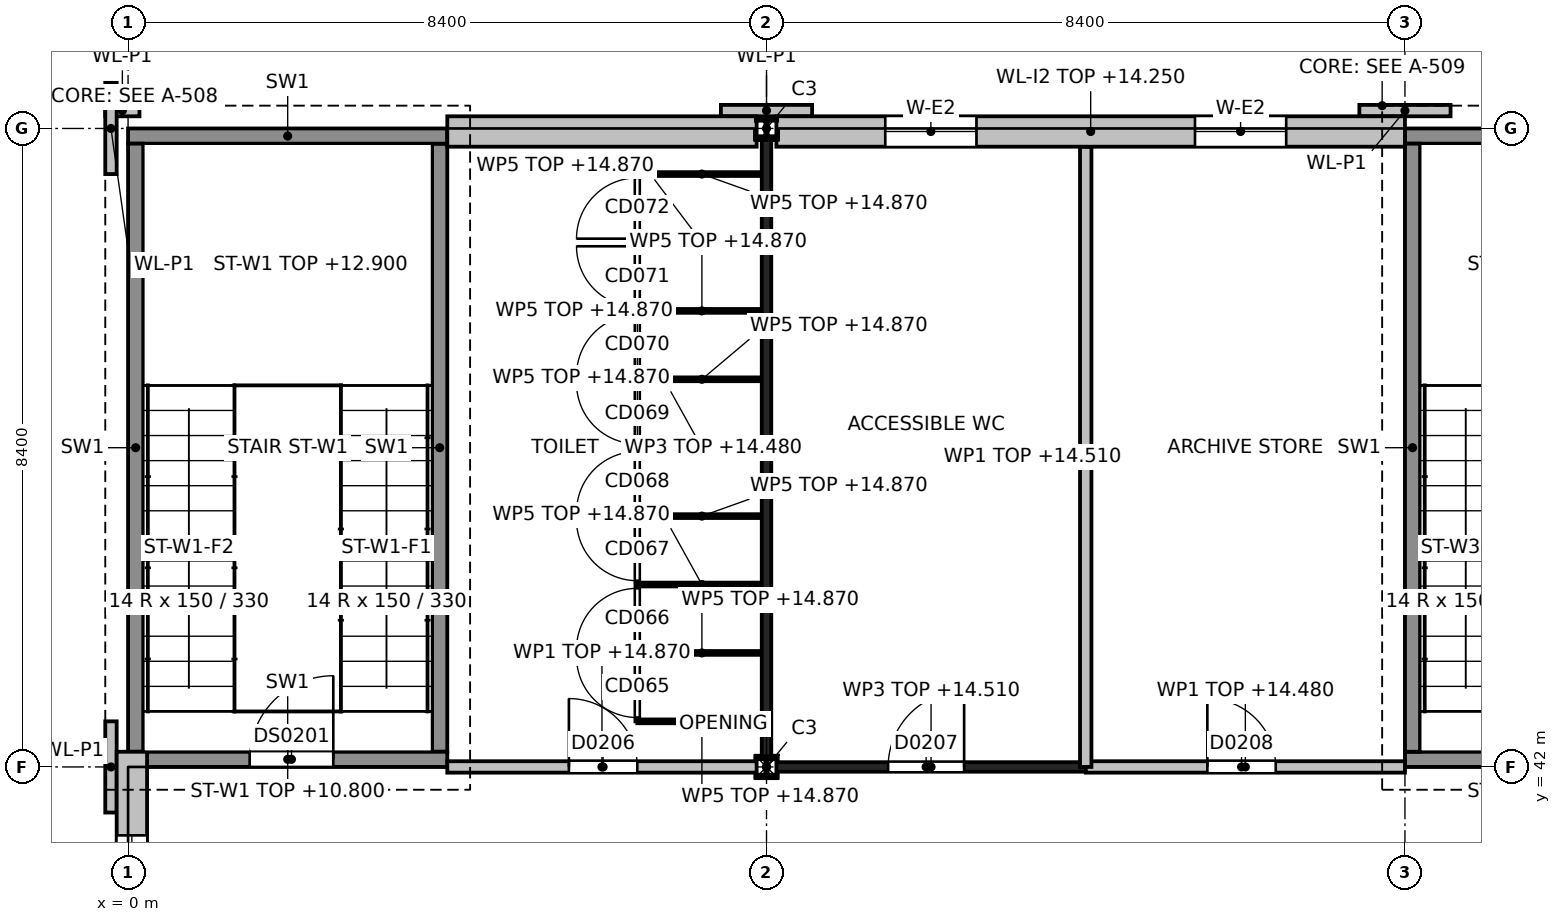
"""IFC4 building model, lengths in metres.
Left out: names, types, materials, properties, quantities, classifications, styles, units other than length and angle.
Written with IfcOpenShell. Run it as: python <this file> out.ifc"""

import sys

from ifc_helpers import new_model, si_unit, direction, frame, frame_2d, origin, origin_2d, place, context, subcontext, project, spatial, rectangle, i_section, extrude, element, fill, save


model = new_model("IFC4")
c1 = context("Model", 3, precision=1e-05, world=origin(), true_north=direction((0.0, 1.0)))
c2 = subcontext(c1, "Body", "Model", "MODEL_VIEW")
j1 = project(units=[si_unit("LENGTHUNIT", "METRE"), si_unit("PLANEANGLEUNIT", "RADIAN")], contexts=[c1])
p1 = place(None, origin())
s1 = spatial("IfcSite", under=j1, at=p1, CompositionType="ELEMENT")
p2 = place(p1, origin())
s2 = spatial("IfcBuilding", under=s1, at=p2, CompositionType="ELEMENT")
p3 = place(p2, frame((0.0, 0.0, 10.8)))
s3 = spatial("IfcBuildingStorey", under=s2, at=p3, CompositionType="ELEMENT", Elevation=10.8)
for number, where, z_axis, x_axis in (
    (1, (8.4, 42.0, 0.0), (0.0, 0.0, 1.0), (1.0, 0.0, 0.0)),
    (2, (8.4, 50.4, 0.0), (0.0, 0.0, 1.0), (1.0, 0.0, 0.0)),
):
    element("IfcColumn", number, at=place(p3, frame(where, z_axis=z_axis, x_axis=x_axis)), inside=s3, PredefinedType="COLUMN", context=c2, shape_type="SweptSolid", body=[
        extrude(i_section(OverallWidth=0.26, OverallDepth=0.26, WebThickness=0.01, FlangeThickness=0.018, at=origin_2d()), origin(), (0.0, 0.0, 1.0), 4.2),
    ])
p4 = place(p3, frame((0.0, 42.1, 0.0), z_axis=(0.0, 0.0, 1.0), x_axis=(1.0, 0.0, 0.0)))
e3 = element("IfcWall", 3, at=p4, inside=s3, PredefinedType="SHEAR", context=c2, shape_type="SweptSolid", body=[
    extrude(rectangle(XDim=4.2, YDim=0.2, at=frame_2d((2.1, 0.0))), origin(), (0.0, 0.0, 1.0), 4.2),
])
p5 = place(p4, frame((1.6, 0.0, 0.0)))
e4 = element("IfcOpeningElement", 4, at=p5, cuts=e3, PredefinedType="OPENING", context=c2, shape_type="SweptSolid", body=[
    extrude(rectangle(XDim=1.1, YDim=2.1, at=frame_2d((0.55, 1.05))), frame((0.0, 0.1, 0.0), z_axis=(0.0, -1.0, 0.0), x_axis=(1.0, 0.0, 0.0)), (0.0, 0.0, 1.0), 0.2),
])
p6 = place(p3, frame((0.0, 50.3, 0.0), z_axis=(0.0, 0.0, 1.0), x_axis=(1.0, 0.0, 0.0)))
e5 = element("IfcWall", 5, at=p6, inside=s3, PredefinedType="SHEAR", context=c2, shape_type="SweptSolid", body=[
    extrude(rectangle(XDim=4.2, YDim=0.2, at=frame_2d((2.1, 0.0))), origin(), (0.0, 0.0, 1.0), 4.2),
])
for number, where, z_axis, x_axis in (
    (6, (0.1, 42.2, 0.0), (0.0, 0.0, 1.0), (0.0, 1.0, 0.0)),
    (7, (4.1, 42.2, 0.0), (0.0, 0.0, 1.0), (0.0, 1.0, 0.0)),
):
    element("IfcWall", number, at=place(p3, frame(where, z_axis=z_axis, x_axis=x_axis)), inside=s3, PredefinedType="SHEAR", context=c2, shape_type="SweptSolid", body=[
        extrude(rectangle(XDim=8.0, YDim=0.2, at=frame_2d((4.0, 0.0))), origin(), (0.0, 0.0, 1.0), 4.2),
    ])
p7 = place(p3, frame((16.8, 42.1, 0.0), z_axis=(0.0, 0.0, 1.0), x_axis=(1.0, 0.0, 0.0)))
e8 = element("IfcWall", 8, at=p7, inside=s3, PredefinedType="SHEAR", context=c2, shape_type="SweptSolid", body=[
    extrude(rectangle(XDim=4.2, YDim=0.2, at=frame_2d((2.1, 0.0))), origin(), (0.0, 0.0, 1.0), 4.2),
])
p8 = place(p7, frame((1.6, 0.0, 0.0)))
e9 = element("IfcOpeningElement", 9, at=p8, cuts=e8, PredefinedType="OPENING", context=c2, shape_type="SweptSolid", body=[
    extrude(rectangle(XDim=1.1, YDim=2.1, at=frame_2d((0.55, 1.05))), frame((0.0, 0.1, 0.0), z_axis=(0.0, -1.0, 0.0), x_axis=(1.0, 0.0, 0.0)), (0.0, 0.0, 1.0), 0.2),
])
p9 = place(p3, frame((16.8, 50.3, 0.0), z_axis=(0.0, 0.0, 1.0), x_axis=(1.0, 0.0, 0.0)))
e10 = element("IfcWall", 10, at=p9, inside=s3, PredefinedType="SHEAR", context=c2, shape_type="SweptSolid", body=[
    extrude(rectangle(XDim=4.2, YDim=0.2, at=frame_2d((2.1, 0.0))), origin(), (0.0, 0.0, 1.0), 4.2),
])
p10 = place(p3, frame((16.9, 42.2, 0.0), z_axis=(0.0, 0.0, 1.0), x_axis=(0.0, 1.0, 0.0)))
e11 = element("IfcWall", 11, at=p10, inside=s3, PredefinedType="SHEAR", context=c2, shape_type="SweptSolid", body=[
    extrude(rectangle(XDim=8.0, YDim=0.2, at=frame_2d((4.0, 0.0))), origin(), (0.0, 0.0, 1.0), 4.2),
])
p11 = place(p3, frame((4.2, 50.36, 0.0), z_axis=(0.0, 0.0, 1.0), x_axis=(1.0, 0.0, 0.0)))
e12 = element("IfcWall", 12, at=p11, inside=s3, PredefinedType="SOLIDWALL", context=c2, shape_type="SweptSolid", body=[
    extrude(rectangle(XDim=4.07, YDim=0.4, at=frame_2d((2.035, 0.0))), origin(), (0.0, 0.0, 1.0), 3.45),
])
p12 = place(p3, frame((8.53, 50.36, 0.0), z_axis=(0.0, 0.0, 1.0), x_axis=(1.0, 0.0, 0.0)))
e13 = element("IfcWall", 13, at=p12, inside=s3, PredefinedType="SOLIDWALL", context=c2, shape_type="SweptSolid", body=[
    extrude(rectangle(XDim=8.27, YDim=0.4, at=frame_2d((4.135, 0.0))), origin(), (0.0, 0.0, 1.0), 3.45),
])
p13 = place(p12, frame((1.433, 0.0, 0.9)))
e14 = element("IfcOpeningElement", 14, at=p13, cuts=e13, PredefinedType="OPENING", context=c2, shape_type="SweptSolid", body=[
    extrude(rectangle(XDim=1.2, YDim=2.4, at=frame_2d((0.6, 1.2))), frame((0.0, 0.2, 0.0), z_axis=(0.0, -1.0, 0.0), x_axis=(1.0, 0.0, 0.0)), (0.0, 0.0, 1.0), 0.4),
])
p14 = place(p12, frame((5.508, 0.0, 0.9)))
e15 = element("IfcOpeningElement", 15, at=p14, cuts=e13, PredefinedType="OPENING", context=c2, shape_type="SweptSolid", body=[
    extrude(rectangle(XDim=1.2, YDim=2.4, at=frame_2d((0.6, 1.2))), frame((0.0, 0.2, 0.0), z_axis=(0.0, -1.0, 0.0), x_axis=(1.0, 0.0, 0.0)), (0.0, 0.0, 1.0), 0.4),
])
p15 = place(p3, frame((-0.3, 50.635, 0.0), z_axis=(0.0, 0.0, 1.0), x_axis=(1.0, 0.0, 0.0)))
e16 = element("IfcWall", 16, at=p15, inside=s3, PredefinedType="SOLIDWALL", context=c2, shape_type="SweptSolid", body=[
    extrude(rectangle(XDim=0.45, YDim=0.15, at=frame_2d((0.225, 0.0))), origin(), (0.0, 0.0, 1.0), 4.2),
])
for number, where, z_axis, x_axis in (
    (17, (7.8, 50.635, 0.0), (0.0, 0.0, 1.0), (1.0, 0.0, 0.0)),
    (18, (16.2, 50.635, 0.0), (0.0, 0.0, 1.0), (1.0, 0.0, 0.0)),
):
    element("IfcWall", number, at=place(p3, frame(where, z_axis=z_axis, x_axis=x_axis)), inside=s3, PredefinedType="SOLIDWALL", context=c2, shape_type="SweptSolid", body=[
        extrude(rectangle(XDim=1.2, YDim=0.15, at=frame_2d((0.6, 0.0))), origin(), (0.0, 0.0, 1.0), 4.2),
    ])
p16 = place(p3, frame((0.05, 33.73, 0.0), z_axis=(0.0, 0.0, 1.0), x_axis=(0.0, 1.0, 0.0)))
e19 = element("IfcWall", 19, at=p16, inside=s3, PredefinedType="SOLIDWALL", context=c2, shape_type="SweptSolid", body=[
    extrude(rectangle(XDim=8.47, YDim=0.4, at=frame_2d((4.235, 0.0))), origin(), (0.0, 0.0, 1.0), 3.45),
])
p17 = place(p16, frame((0.77, 0.0, 0.9)))
e20 = element("IfcOpeningElement", 20, at=p17, cuts=e19, PredefinedType="OPENING", context=c2, shape_type="SweptSolid", body=[
    extrude(rectangle(XDim=3.0, YDim=2.4, at=frame_2d((1.5, 1.2))), frame((0.0, 0.2, 0.0), z_axis=(0.0, -1.0, 0.0), x_axis=(1.0, 0.0, 0.0)), (0.0, 0.0, 1.0), 0.4),
])
p18 = place(p16, frame((4.37, 0.0, 0.9)))
e21 = element("IfcOpeningElement", 21, at=p18, cuts=e19, PredefinedType="OPENING", context=c2, shape_type="SweptSolid", body=[
    extrude(rectangle(XDim=3.0, YDim=2.4, at=frame_2d((1.5, 1.2))), frame((0.0, 0.2, 0.0), z_axis=(0.0, -1.0, 0.0), x_axis=(1.0, 0.0, 0.0)), (0.0, 0.0, 1.0), 0.4),
])
p19 = place(p3, frame((-0.225, 41.4, 0.0), z_axis=(0.0, 0.0, 1.0), x_axis=(0.0, 1.0, 0.0)))
e22 = element("IfcWall", 22, at=p19, inside=s3, PredefinedType="SOLIDWALL", context=c2, shape_type="SweptSolid", body=[
    extrude(rectangle(XDim=1.2, YDim=0.15, at=frame_2d((0.6, 0.0))), origin(), (0.0, 0.0, 1.0), 4.2),
])
p20 = place(p3, frame((-0.225, 49.8, 0.0), z_axis=(0.0, 0.0, 1.0), x_axis=(0.0, 1.0, 0.0)))
e23 = element("IfcWall", 23, at=p20, inside=s3, PredefinedType="SOLIDWALL", context=c2, shape_type="SweptSolid", body=[
    extrude(rectangle(XDim=1.2, YDim=0.15, at=frame_2d((0.6, 0.0))), origin(), (0.0, 0.0, 1.0), 4.2),
])
p21 = place(p3, frame((4.2, 42.0, 0.0), z_axis=(0.0, 0.0, 1.0), x_axis=(1.0, 0.0, 0.0)))
e24 = element("IfcWall", 24, at=p21, inside=s3, PredefinedType="PARTITIONING", context=c2, shape_type="SweptSolid", body=[
    extrude(rectangle(XDim=4.07, YDim=0.15, at=frame_2d((2.035, 0.0))), origin(), (0.0, 0.0, 1.0), 4.07),
])
p22 = place(p21, frame((1.6, 0.0, 0.0)))
e25 = element("IfcOpeningElement", 25, at=p22, cuts=e24, PredefinedType="OPENING", context=c2, shape_type="SweptSolid", body=[
    extrude(rectangle(XDim=0.9, YDim=2.1, at=frame_2d((0.45, 1.05))), frame((0.0, 0.075, 0.0), z_axis=(0.0, -1.0, 0.0), x_axis=(1.0, 0.0, 0.0)), (0.0, 0.0, 1.0), 0.15),
])
p23 = place(p3, frame((8.53, 42.0, 0.0), z_axis=(0.0, 0.0, 1.0), x_axis=(1.0, 0.0, 0.0)))
e26 = element("IfcWall", 26, at=p23, inside=s3, PredefinedType="PARTITIONING", context=c2, shape_type="SweptSolid", body=[
    extrude(rectangle(XDim=4.07, YDim=0.125, at=frame_2d((2.035, 0.0))), origin(), (0.0, 0.0, 1.0), 3.71),
])
p24 = place(p23, frame((1.47, 0.0, 0.0)))
e27 = element("IfcOpeningElement", 27, at=p24, cuts=e26, PredefinedType="OPENING", context=c2, shape_type="SweptSolid", body=[
    extrude(rectangle(XDim=1.0, YDim=2.1, at=frame_2d((0.5, 1.05))), frame((0.0, 0.062, 0.0), z_axis=(0.0, -1.0, 0.0), x_axis=(1.0, 0.0, 0.0)), (0.0, 0.0, 1.0), 0.125),
])
p25 = place(p3, frame((12.6, 42.0, 0.0), z_axis=(0.0, 0.0, 1.0), x_axis=(1.0, 0.0, 0.0)))
e28 = element("IfcWall", 28, at=p25, inside=s3, PredefinedType="PARTITIONING", context=c2, shape_type="SweptSolid", body=[
    extrude(rectangle(XDim=4.2, YDim=0.15, at=frame_2d((2.1, 0.0))), origin(), (0.0, 0.0, 1.0), 3.68),
])
p26 = place(p25, frame((1.6, 0.0, 0.0)))
e29 = element("IfcOpeningElement", 29, at=p26, cuts=e28, PredefinedType="OPENING", context=c2, shape_type="SweptSolid", body=[
    extrude(rectangle(XDim=0.9, YDim=2.1, at=frame_2d((0.45, 1.05))), frame((0.0, 0.075, 0.0), z_axis=(0.0, -1.0, 0.0), x_axis=(1.0, 0.0, 0.0)), (0.0, 0.0, 1.0), 0.15),
])
p27 = place(p3, frame((8.4, 42.13, 0.0), z_axis=(0.0, 0.0, 1.0), x_axis=(0.0, 1.0, 0.0)))
e30 = element("IfcWall", 30, at=p27, inside=s3, PredefinedType="PARTITIONING", context=c2, shape_type="SweptSolid", body=[
    extrude(rectangle(XDim=8.14, YDim=0.125, at=frame_2d((4.07, 0.0))), origin(), (0.0, 0.0, 1.0), 3.68),
])
p28 = place(p3, frame((12.6, 42.0, 0.0), z_axis=(0.0, 0.0, 1.0), x_axis=(0.0, 1.0, 0.0)))
e31 = element("IfcWall", 31, at=p28, inside=s3, PredefinedType="PARTITIONING", context=c2, shape_type="SweptSolid", body=[
    extrude(rectangle(XDim=8.159, YDim=0.15, at=frame_2d((4.08, 0.0))), origin(), (0.0, 0.0, 1.0), 3.71),
])
p29 = place(p3, frame((6.7, 42.6, 0.0), z_axis=(0.0, 0.0, 1.0), x_axis=(0.0, 1.0, 0.0)))
e32 = element("IfcWall", 32, at=p29, inside=s3, PredefinedType="PARTITIONING", context=c2, shape_type="SweptSolid", body=[
    extrude(rectangle(XDim=7.2, YDim=0.05, at=frame_2d((3.6, 0.0))), origin(), (0.0, 0.0, 1.0), 4.07),
])
p30 = place(p29, frame((0.05, 0.0, 0.0)))
e33 = element("IfcOpeningElement", 33, at=p30, cuts=e32, PredefinedType="OPENING", context=c2, shape_type="SweptSolid", body=[
    extrude(rectangle(XDim=0.8, YDim=2.0, at=frame_2d((0.4, 1.0))), frame((0.0, 0.025, 0.0), z_axis=(0.0, -1.0, 0.0), x_axis=(1.0, 0.0, 0.0)), (0.0, 0.0, 1.0), 0.05),
])
p31 = place(p29, frame((0.95, 0.0, 0.0)))
e34 = element("IfcOpeningElement", 34, at=p31, cuts=e32, PredefinedType="OPENING", context=c2, shape_type="SweptSolid", body=[
    extrude(rectangle(XDim=0.8, YDim=2.0, at=frame_2d((0.4, 1.0))), frame((0.0, 0.025, 0.0), z_axis=(0.0, -1.0, 0.0), x_axis=(1.0, 0.0, 0.0)), (0.0, 0.0, 1.0), 0.05),
])
p32 = place(p29, frame((1.85, 0.0, 0.0)))
e35 = element("IfcOpeningElement", 35, at=p32, cuts=e32, PredefinedType="OPENING", context=c2, shape_type="SweptSolid", body=[
    extrude(rectangle(XDim=0.8, YDim=2.0, at=frame_2d((0.4, 1.0))), frame((0.0, 0.025, 0.0), z_axis=(0.0, -1.0, 0.0), x_axis=(1.0, 0.0, 0.0)), (0.0, 0.0, 1.0), 0.05),
])
p33 = place(p29, frame((2.75, 0.0, 0.0)))
e36 = element("IfcOpeningElement", 36, at=p33, cuts=e32, PredefinedType="OPENING", context=c2, shape_type="SweptSolid", body=[
    extrude(rectangle(XDim=0.8, YDim=2.0, at=frame_2d((0.4, 1.0))), frame((0.0, 0.025, 0.0), z_axis=(0.0, -1.0, 0.0), x_axis=(1.0, 0.0, 0.0)), (0.0, 0.0, 1.0), 0.05),
])
p34 = place(p29, frame((3.65, 0.0, 0.0)))
e37 = element("IfcOpeningElement", 37, at=p34, cuts=e32, PredefinedType="OPENING", context=c2, shape_type="SweptSolid", body=[
    extrude(rectangle(XDim=0.8, YDim=2.0, at=frame_2d((0.4, 1.0))), frame((0.0, 0.025, 0.0), z_axis=(0.0, -1.0, 0.0), x_axis=(1.0, 0.0, 0.0)), (0.0, 0.0, 1.0), 0.05),
])
p35 = place(p29, frame((4.55, 0.0, 0.0)))
e38 = element("IfcOpeningElement", 38, at=p35, cuts=e32, PredefinedType="OPENING", context=c2, shape_type="SweptSolid", body=[
    extrude(rectangle(XDim=0.8, YDim=2.0, at=frame_2d((0.4, 1.0))), frame((0.0, 0.025, 0.0), z_axis=(0.0, -1.0, 0.0), x_axis=(1.0, 0.0, 0.0)), (0.0, 0.0, 1.0), 0.05),
])
p36 = place(p29, frame((5.45, 0.0, 0.0)))
e39 = element("IfcOpeningElement", 39, at=p36, cuts=e32, PredefinedType="OPENING", context=c2, shape_type="SweptSolid", body=[
    extrude(rectangle(XDim=0.8, YDim=2.0, at=frame_2d((0.4, 1.0))), frame((0.0, 0.025, 0.0), z_axis=(0.0, -1.0, 0.0), x_axis=(1.0, 0.0, 0.0)), (0.0, 0.0, 1.0), 0.05),
])
p37 = place(p29, frame((6.35, 0.0, 0.0)))
e40 = element("IfcOpeningElement", 40, at=p37, cuts=e32, PredefinedType="OPENING", context=c2, shape_type="SweptSolid", body=[
    extrude(rectangle(XDim=0.8, YDim=2.0, at=frame_2d((0.4, 1.0))), frame((0.0, 0.025, 0.0), z_axis=(0.0, -1.0, 0.0), x_axis=(1.0, 0.0, 0.0)), (0.0, 0.0, 1.0), 0.05),
])
for number, where, z_axis, x_axis in (
    (41, (8.4, 42.6, 0.0), (0.0, 0.0, 1.0), (-1.0, 0.0, 0.0)),
    (42, (8.4, 43.5, 0.0), (0.0, 0.0, 1.0), (-1.0, 0.0, 0.0)),
    (43, (8.4, 44.4, 0.0), (0.0, 0.0, 1.0), (-1.0, 0.0, 0.0)),
    (44, (8.4, 45.3, 0.0), (0.0, 0.0, 1.0), (-1.0, 0.0, 0.0)),
    (45, (8.4, 46.2, 0.0), (0.0, 0.0, 1.0), (-1.0, 0.0, 0.0)),
    (46, (8.4, 47.1, 0.0), (0.0, 0.0, 1.0), (-1.0, 0.0, 0.0)),
    (47, (8.4, 48.0, 0.0), (0.0, 0.0, 1.0), (-1.0, 0.0, 0.0)),
    (48, (8.4, 48.9, 0.0), (0.0, 0.0, 1.0), (-1.0, 0.0, 0.0)),
    (49, (8.4, 49.8, 0.0), (0.0, 0.0, 1.0), (-1.0, 0.0, 0.0)),
):
    element("IfcWall", number, at=place(p3, frame(where, z_axis=z_axis, x_axis=x_axis)), inside=s3, PredefinedType="PARTITIONING", context=c2, shape_type="SweptSolid", body=[
        extrude(rectangle(XDim=1.7, YDim=0.05, at=frame_2d((0.85, 0.0))), origin(), (0.0, 0.0, 1.0), 4.07),
    ])
p38 = place(p13, origin())
e50 = element("IfcWindow", 50, at=p38, inside=s3, PartitioningType="SINGLE_PANEL", PredefinedType="WINDOW", context=c2, shape_type="SweptSolid", body=[
    extrude(rectangle(XDim=1.2, YDim=2.4, at=frame_2d((0.6, 1.2))), frame((0.0, 0.03, 0.0), z_axis=(0.0, -1.0, 0.0), x_axis=(1.0, 0.0, 0.0)), (0.0, 0.0, 1.0), 0.06),
])
fill(e14, e50)
p39 = place(p14, origin())
e51 = element("IfcWindow", 51, at=p39, inside=s3, PartitioningType="SINGLE_PANEL", PredefinedType="WINDOW", context=c2, shape_type="SweptSolid", body=[
    extrude(rectangle(XDim=1.2, YDim=2.4, at=frame_2d((0.6, 1.2))), frame((0.0, 0.03, 0.0), z_axis=(0.0, -1.0, 0.0), x_axis=(1.0, 0.0, 0.0)), (0.0, 0.0, 1.0), 0.06),
])
fill(e15, e51)
p40 = place(p18, origin())
e52 = element("IfcWindow", 52, at=p40, inside=s3, PartitioningType="SINGLE_PANEL", PredefinedType="WINDOW", context=c2, shape_type="SweptSolid", body=[
    extrude(rectangle(XDim=3.0, YDim=2.4, at=frame_2d((1.5, 1.2))), frame((0.0, 0.03, 0.0), z_axis=(0.0, -1.0, 0.0), x_axis=(1.0, 0.0, 0.0)), (0.0, 0.0, 1.0), 0.06),
])
fill(e21, e52)
p41 = place(p22, origin())
e53 = element("IfcDoor", 53, at=p41, inside=s3, OperationType="SINGLE_SWING_LEFT", PredefinedType="DOOR", context=c2, shape_type="SweptSolid", body=[
    extrude(rectangle(XDim=0.9, YDim=2.1, at=frame_2d((0.45, 1.05))), frame((0.0, 0.025, 0.0), z_axis=(0.0, -1.0, 0.0), x_axis=(1.0, 0.0, 0.0)), (0.0, 0.0, 1.0), 0.05),
])
fill(e25, e53)
p42 = place(p24, origin())
e54 = element("IfcDoor", 54, at=p42, inside=s3, OperationType="SINGLE_SWING_RIGHT", PredefinedType="DOOR", context=c2, shape_type="SweptSolid", body=[
    extrude(rectangle(XDim=1.0, YDim=2.1, at=frame_2d((0.5, 1.05))), frame((0.0, 0.025, 0.0), z_axis=(0.0, -1.0, 0.0), x_axis=(1.0, 0.0, 0.0)), (0.0, 0.0, 1.0), 0.05),
])
fill(e27, e54)
p43 = place(p26, origin())
e55 = element("IfcDoor", 55, at=p43, inside=s3, OperationType="SINGLE_SWING_LEFT", PredefinedType="DOOR", context=c2, shape_type="SweptSolid", body=[
    extrude(rectangle(XDim=0.9, YDim=2.1, at=frame_2d((0.45, 1.05))), frame((0.0, 0.025, 0.0), z_axis=(0.0, -1.0, 0.0), x_axis=(1.0, 0.0, 0.0)), (0.0, 0.0, 1.0), 0.05),
])
fill(e29, e55)
p44 = place(p5, origin())
e56 = element("IfcDoor", 56, at=p44, inside=s3, OperationType="SINGLE_SWING_RIGHT", PredefinedType="DOOR", context=c2, shape_type="SweptSolid", body=[
    extrude(rectangle(XDim=1.1, YDim=2.1, at=frame_2d((0.55, 1.05))), frame((0.0, 0.025, 0.0), z_axis=(0.0, -1.0, 0.0), x_axis=(1.0, 0.0, 0.0)), (0.0, 0.0, 1.0), 0.05),
])
fill(e4, e56)
p45 = place(p30, origin())
e57 = element("IfcDoor", 57, at=p45, inside=s3, OperationType="SINGLE_SWING_RIGHT", PredefinedType="DOOR", context=c2, shape_type="SweptSolid", body=[
    extrude(rectangle(XDim=0.8, YDim=2.0, at=frame_2d((0.4, 1.0))), frame((0.0, 0.025, 0.0), z_axis=(0.0, -1.0, 0.0), x_axis=(1.0, 0.0, 0.0)), (0.0, 0.0, 1.0), 0.05),
])
fill(e33, e57)
p46 = place(p31, origin())
e58 = element("IfcDoor", 58, at=p46, inside=s3, OperationType="SINGLE_SWING_LEFT", PredefinedType="DOOR", context=c2, shape_type="SweptSolid", body=[
    extrude(rectangle(XDim=0.8, YDim=2.0, at=frame_2d((0.4, 1.0))), frame((0.0, 0.025, 0.0), z_axis=(0.0, -1.0, 0.0), x_axis=(1.0, 0.0, 0.0)), (0.0, 0.0, 1.0), 0.05),
])
fill(e34, e58)
p47 = place(p32, origin())
e59 = element("IfcDoor", 59, at=p47, inside=s3, OperationType="SINGLE_SWING_RIGHT", PredefinedType="DOOR", context=c2, shape_type="SweptSolid", body=[
    extrude(rectangle(XDim=0.8, YDim=2.0, at=frame_2d((0.4, 1.0))), frame((0.0, 0.025, 0.0), z_axis=(0.0, -1.0, 0.0), x_axis=(1.0, 0.0, 0.0)), (0.0, 0.0, 1.0), 0.05),
])
fill(e35, e59)
p48 = place(p33, origin())
e60 = element("IfcDoor", 60, at=p48, inside=s3, OperationType="SINGLE_SWING_LEFT", PredefinedType="DOOR", context=c2, shape_type="SweptSolid", body=[
    extrude(rectangle(XDim=0.8, YDim=2.0, at=frame_2d((0.4, 1.0))), frame((0.0, 0.025, 0.0), z_axis=(0.0, -1.0, 0.0), x_axis=(1.0, 0.0, 0.0)), (0.0, 0.0, 1.0), 0.05),
])
fill(e36, e60)
p49 = place(p34, origin())
e61 = element("IfcDoor", 61, at=p49, inside=s3, OperationType="SINGLE_SWING_RIGHT", PredefinedType="DOOR", context=c2, shape_type="SweptSolid", body=[
    extrude(rectangle(XDim=0.8, YDim=2.0, at=frame_2d((0.4, 1.0))), frame((0.0, 0.025, 0.0), z_axis=(0.0, -1.0, 0.0), x_axis=(1.0, 0.0, 0.0)), (0.0, 0.0, 1.0), 0.05),
])
fill(e37, e61)
p50 = place(p35, origin())
e62 = element("IfcDoor", 62, at=p50, inside=s3, OperationType="SINGLE_SWING_LEFT", PredefinedType="DOOR", context=c2, shape_type="SweptSolid", body=[
    extrude(rectangle(XDim=0.8, YDim=2.0, at=frame_2d((0.4, 1.0))), frame((0.0, 0.025, 0.0), z_axis=(0.0, -1.0, 0.0), x_axis=(1.0, 0.0, 0.0)), (0.0, 0.0, 1.0), 0.05),
])
fill(e38, e62)
p51 = place(p36, origin())
e63 = element("IfcDoor", 63, at=p51, inside=s3, OperationType="SINGLE_SWING_RIGHT", PredefinedType="DOOR", context=c2, shape_type="SweptSolid", body=[
    extrude(rectangle(XDim=0.8, YDim=2.0, at=frame_2d((0.4, 1.0))), frame((0.0, 0.025, 0.0), z_axis=(0.0, -1.0, 0.0), x_axis=(1.0, 0.0, 0.0)), (0.0, 0.0, 1.0), 0.05),
])
fill(e39, e63)
p52 = place(p37, origin())
e64 = element("IfcDoor", 64, at=p52, inside=s3, OperationType="SINGLE_SWING_LEFT", PredefinedType="DOOR", context=c2, shape_type="SweptSolid", body=[
    extrude(rectangle(XDim=0.8, YDim=2.0, at=frame_2d((0.4, 1.0))), frame((0.0, 0.025, 0.0), z_axis=(0.0, -1.0, 0.0), x_axis=(1.0, 0.0, 0.0)), (0.0, 0.0, 1.0), 0.05),
])
fill(e40, e64)
save(model, sys.argv[1])
